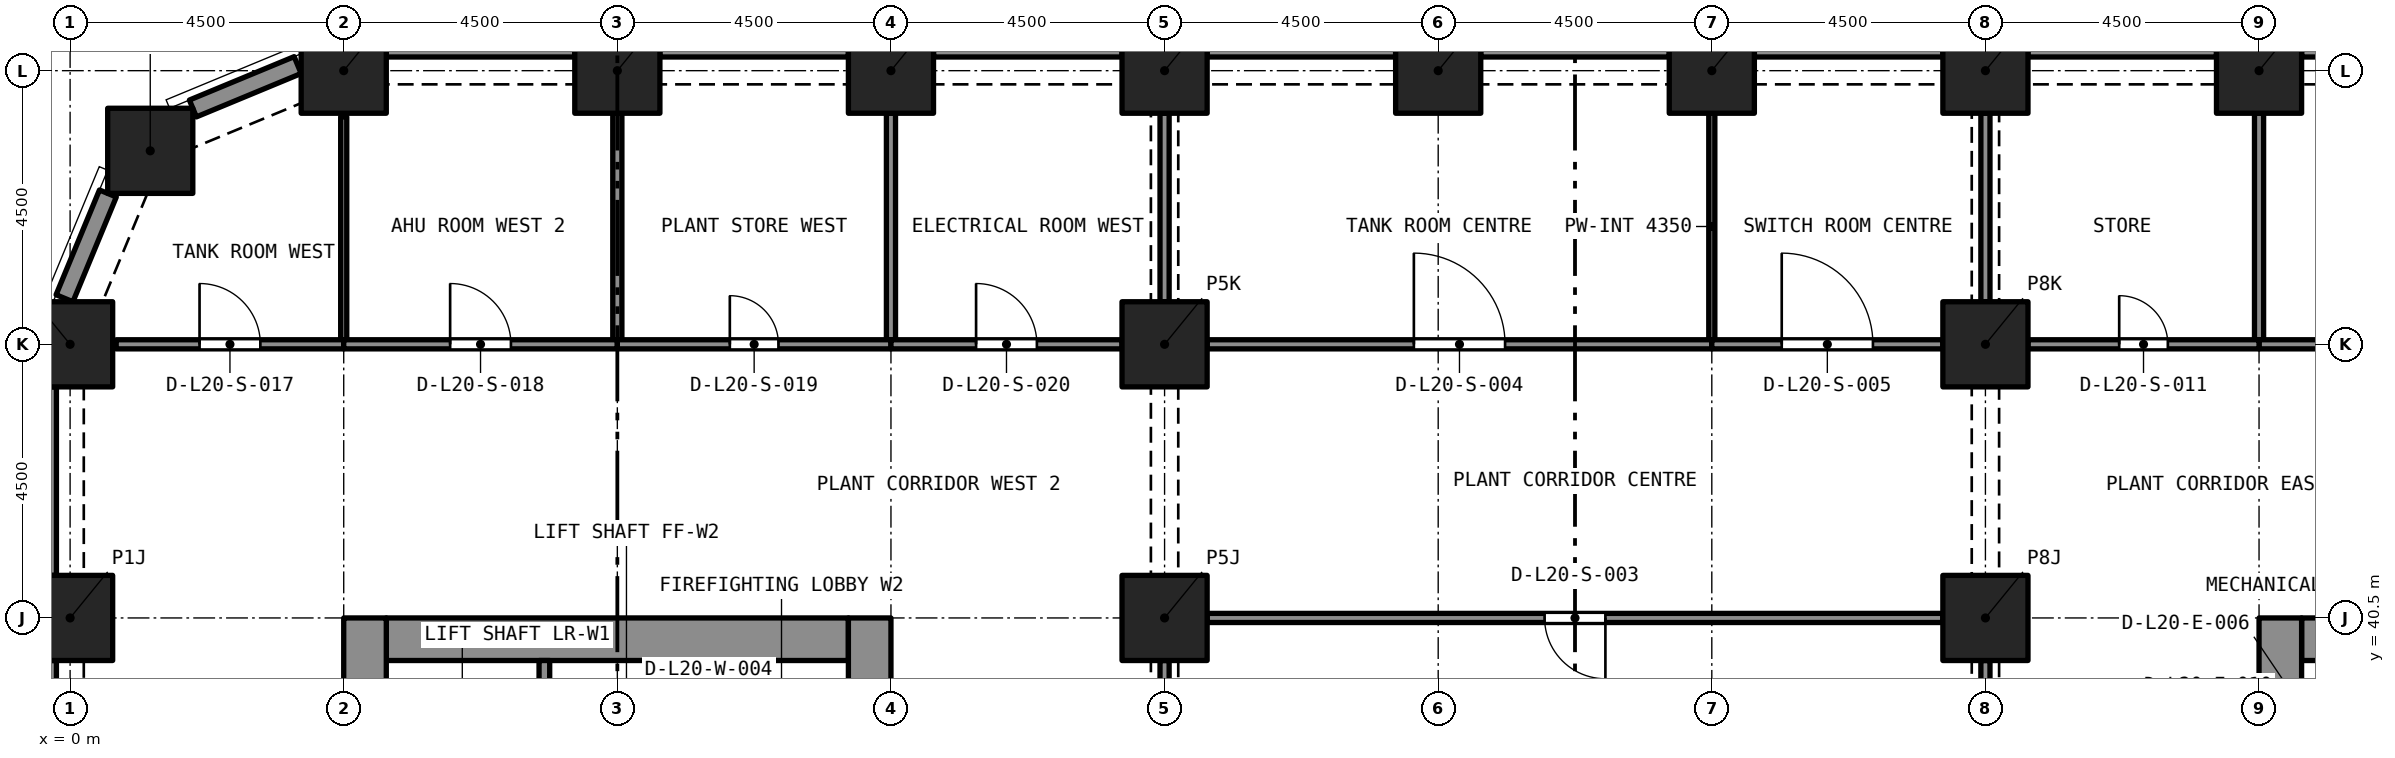
"""IFC4 building model, lengths in metres.
Left out: names, types, materials, properties, quantities, classifications, styles, units other than length and angle.
Written with IfcOpenShell. Run it as: python <this file> out.ifc"""

import sys

from ifc_helpers import new_model, si_unit, direction, frame, frame_2d, origin, origin_2d, place, context, subcontext, project, spatial, rectangle, extrude, element, fill, save


model = new_model("IFC4")
c1 = context("Model", 3, precision=1e-05, world=origin(), true_north=direction((0.0, 1.0)))
c2 = subcontext(c1, "Body", "Model", "MODEL_VIEW")
j1 = project(units=[si_unit("LENGTHUNIT", "METRE"), si_unit("PLANEANGLEUNIT", "RADIAN")], contexts=[c1])
p1 = place(None, origin())
s1 = spatial("IfcSite", under=j1, at=p1, CompositionType="ELEMENT")
p2 = place(p1, origin())
s2 = spatial("IfcBuilding", under=s1, at=p2, CompositionType="ELEMENT")
p3 = place(p2, frame((0.0, 0.0, 75.2)))
s3 = spatial("IfcBuildingStorey", under=s2, at=p3, CompositionType="ELEMENT", Elevation=75.2)
for number, where, z_axis, x_axis in (
    (1, (0.0, 40.5, 0.0), (0.0, 0.0, 1.0), (1.0, 0.0, 0.0)),
    (2, (18.0, 40.5, 0.0), (0.0, 0.0, 1.0), (1.0, 0.0, 0.0)),
    (3, (31.5, 40.5, 0.0), (0.0, 0.0, 1.0), (1.0, 0.0, 0.0)),
    (4, (0.0, 45.0, 0.0), (0.0, 0.0, 1.0), (1.0, 0.0, 0.0)),
    (5, (18.0, 45.0, 0.0), (0.0, 0.0, 1.0), (1.0, 0.0, 0.0)),
    (6, (31.5, 45.0, 0.0), (0.0, 0.0, 1.0), (1.0, 0.0, 0.0)),
    (7, (1.318, 48.182, 0.0), (0.0, 0.0, 1.0), (1.0, 0.0, 0.0)),
    (8, (4.5, 49.5, 0.0), (0.0, 0.0, 1.0), (1.0, 0.0, 0.0)),
    (9, (9.0, 49.5, 0.0), (0.0, 0.0, 1.0), (1.0, 0.0, 0.0)),
    (10, (13.5, 49.5, 0.0), (0.0, 0.0, 1.0), (1.0, 0.0, 0.0)),
    (11, (18.0, 49.5, 0.0), (0.0, 0.0, 1.0), (1.0, 0.0, 0.0)),
    (12, (22.5, 49.5, 0.0), (0.0, 0.0, 1.0), (1.0, 0.0, 0.0)),
    (13, (27.0, 49.5, 0.0), (0.0, 0.0, 1.0), (1.0, 0.0, 0.0)),
    (14, (31.5, 49.5, 0.0), (0.0, 0.0, 1.0), (1.0, 0.0, 0.0)),
    (15, (36.0, 49.5, 0.0), (0.0, 0.0, 1.0), (1.0, 0.0, 0.0)),
):
    element("IfcColumn", number, at=place(p3, frame(where, z_axis=z_axis, x_axis=x_axis)), inside=s3, PredefinedType="COLUMN", context=c2, shape_type="SweptSolid", body=[
        extrude(rectangle(XDim=1.4, YDim=1.4, at=origin_2d()), origin(), (0.0, 0.0, 1.0), 4.8),
    ])
p4 = place(p3, frame((5.2, 40.15, 0.0), z_axis=(0.0, 0.0, 1.0), x_axis=(1.0, 0.0, 0.0)))
e16 = element("IfcWall", 16, at=p4, inside=s3, PredefinedType="SOLIDWALL", context=c2, shape_type="SweptSolid", body=[
    extrude(rectangle(XDim=7.6, YDim=0.7, at=frame_2d((3.8, 0.0))), origin(), (0.0, 0.0, 1.0), 4.8),
])
p5 = place(p3, frame((4.85, 27.0, 0.0), z_axis=(0.0, 0.0, 1.0), x_axis=(0.0, 1.0, 0.0)))
e17 = element("IfcWall", 17, at=p5, inside=s3, PredefinedType="SOLIDWALL", context=c2, shape_type="SweptSolid", body=[
    extrude(rectangle(XDim=13.5, YDim=0.7, at=frame_2d((6.75, 0.0))), origin(), (0.0, 0.0, 1.0), 4.8),
])
p6 = place(p5, frame((8.95, 0.0, 0.0)))
e18 = element("IfcOpeningElement", 18, at=p6, cuts=e17, PredefinedType="OPENING", context=c2, shape_type="SweptSolid", body=[
    extrude(rectangle(XDim=1.2, YDim=2.1, at=frame_2d((0.6, 1.05))), frame((0.0, 0.36, 0.0), z_axis=(0.0, -1.0, 0.0), x_axis=(1.0, 0.0, 0.0)), (0.0, 0.0, 1.0), 0.72),
])
p7 = place(p3, frame((13.15, 27.0, 0.0), z_axis=(0.0, 0.0, 1.0), x_axis=(0.0, 1.0, 0.0)))
e19 = element("IfcWall", 19, at=p7, inside=s3, PredefinedType="SOLIDWALL", context=c2, shape_type="SweptSolid", body=[
    extrude(rectangle(XDim=13.5, YDim=0.7, at=frame_2d((6.75, 0.0))), origin(), (0.0, 0.0, 1.0), 4.8),
])
p8 = place(p7, frame((11.1, 0.0, 0.0)))
e20 = element("IfcOpeningElement", 20, at=p8, cuts=e19, PredefinedType="OPENING", context=c2, shape_type="SweptSolid", body=[
    extrude(rectangle(XDim=1.1, YDim=2.1, at=frame_2d((0.55, 1.05))), frame((0.0, 0.36, 0.0), z_axis=(0.0, -1.0, 0.0), x_axis=(1.0, 0.0, 0.0)), (0.0, 0.0, 1.0), 0.72),
])
p9 = place(p7, frame((8.95, 0.0, 0.0)))
e21 = element("IfcOpeningElement", 21, at=p9, cuts=e19, PredefinedType="OPENING", context=c2, shape_type="SweptSolid", body=[
    extrude(rectangle(XDim=1.2, YDim=2.1, at=frame_2d((0.6, 1.05))), frame((0.0, 0.36, 0.0), z_axis=(0.0, -1.0, 0.0), x_axis=(1.0, 0.0, 0.0)), (0.0, 0.0, 1.0), 0.72),
])
p10 = place(p3, frame((36.7, 40.15, 0.0), z_axis=(0.0, 0.0, 1.0), x_axis=(1.0, 0.0, 0.0)))
e22 = element("IfcWall", 22, at=p10, inside=s3, PredefinedType="SOLIDWALL", context=c2, shape_type="SweptSolid", body=[
    extrude(rectangle(XDim=7.6, YDim=0.7, at=frame_2d((3.8, 0.0))), origin(), (0.0, 0.0, 1.0), 4.8),
])
p11 = place(p3, frame((36.35, 27.0, 0.0), z_axis=(0.0, 0.0, 1.0), x_axis=(0.0, 1.0, 0.0)))
e23 = element("IfcWall", 23, at=p11, inside=s3, PredefinedType="SOLIDWALL", context=c2, shape_type="SweptSolid", body=[
    extrude(rectangle(XDim=13.5, YDim=0.7, at=frame_2d((6.75, 0.0))), origin(), (0.0, 0.0, 1.0), 4.8),
])
p12 = place(p11, frame((8.95, 0.0, 0.0)))
e24 = element("IfcOpeningElement", 24, at=p12, cuts=e23, PredefinedType="OPENING", context=c2, shape_type="SweptSolid", body=[
    extrude(rectangle(XDim=1.2, YDim=2.1, at=frame_2d((0.6, 1.05))), frame((0.0, 0.36, 0.0), z_axis=(0.0, -1.0, 0.0), x_axis=(1.0, 0.0, 0.0)), (0.0, 0.0, 1.0), 0.72),
])
for number, where, z_axis, x_axis in (
    (25, (36.7, 49.875, 0.0), (0.0, 0.0, 1.0), (1.0, 0.0, 0.0)),
    (26, (32.2, 49.875, 0.0), (0.0, 0.0, 1.0), (1.0, 0.0, 0.0)),
    (27, (27.7, 49.875, 0.0), (0.0, 0.0, 1.0), (1.0, 0.0, 0.0)),
    (28, (23.2, 49.875, 0.0), (0.0, 0.0, 1.0), (1.0, 0.0, 0.0)),
    (29, (18.7, 49.875, 0.0), (0.0, 0.0, 1.0), (1.0, 0.0, 0.0)),
    (30, (14.2, 49.875, 0.0), (0.0, 0.0, 1.0), (1.0, 0.0, 0.0)),
    (31, (9.7, 49.875, 0.0), (0.0, 0.0, 1.0), (1.0, 0.0, 0.0)),
    (32, (5.2, 49.875, 0.0), (0.0, 0.0, 1.0), (1.0, 0.0, 0.0)),
):
    element("IfcWall", number, at=place(p3, frame(where, z_axis=z_axis, x_axis=x_axis)), inside=s3, PredefinedType="SOLIDWALL", context=c2, shape_type="SweptSolid", body=[
        extrude(rectangle(XDim=3.1, YDim=0.3, at=frame_2d((1.55, 0.0))), origin(), (0.0, 0.0, 1.0), 4.8),
    ])
p13 = place(p3, frame((2.02, 48.878, 0.0), z_axis=(0.0, 0.0, 1.0), x_axis=(0.923903565336, 0.38262540684, 0.0)))
e33 = element("IfcWall", 33, at=p13, inside=s3, PredefinedType="SOLIDWALL", context=c2, shape_type="SweptSolid", body=[
    extrude(rectangle(XDim=1.865, YDim=0.3, at=frame_2d((0.933, 0.0))), origin(), (0.0, 0.0, 1.0), 4.8),
])
p14 = place(p3, frame((-0.092, 45.757, 0.0), z_axis=(0.0, 0.0, 1.0), x_axis=(0.382737135771, 0.923857286003, 0.0)))
e34 = element("IfcWall", 34, at=p14, inside=s3, PredefinedType="SOLIDWALL", context=c2, shape_type="SweptSolid", body=[
    extrude(rectangle(XDim=1.865, YDim=0.3, at=frame_2d((0.933, 0.0))), origin(), (0.0, 0.0, 1.0), 4.8),
])
for number, where, z_axis, x_axis in (
    (35, (-0.375, 41.2, 0.0), (0.0, 0.0, 1.0), (0.0, 1.0, 0.0)),
    (36, (-0.375, 36.7, 0.0), (0.0, 0.0, 1.0), (0.0, 1.0, 0.0)),
):
    element("IfcWall", number, at=place(p3, frame(where, z_axis=z_axis, x_axis=x_axis)), inside=s3, PredefinedType="SOLIDWALL", context=c2, shape_type="SweptSolid", body=[
        extrude(rectangle(XDim=3.1, YDim=0.3, at=frame_2d((1.55, 0.0))), origin(), (0.0, 0.0, 1.0), 4.8),
    ])
p15 = place(p3, frame((7.8, 37.5, 0.0), z_axis=(0.0, 0.0, 1.0), x_axis=(0.0, 1.0, 0.0)))
e37 = element("IfcWall", 37, at=p15, inside=s3, PredefinedType="SOLIDWALL", context=c2, shape_type="SweptSolid", body=[
    extrude(rectangle(XDim=2.3, YDim=0.175, at=frame_2d((1.15, 0.0))), origin(), (0.0, 0.0, 1.0), 4.5),
])
p16 = place(p3, frame((10.5, 37.5, 0.0), z_axis=(0.0, 0.0, 1.0), x_axis=(0.0, 1.0, 0.0)))
e38 = element("IfcWall", 38, at=p16, inside=s3, PredefinedType="SOLIDWALL", context=c2, shape_type="SweptSolid", body=[
    extrude(rectangle(XDim=2.3, YDim=0.175, at=frame_2d((1.15, 0.0))), origin(), (0.0, 0.0, 1.0), 4.5),
])
p17 = place(p16, frame((0.65, 0.0, 0.0)))
e39 = element("IfcOpeningElement", 39, at=p17, cuts=e38, PredefinedType="OPENING", context=c2, shape_type="SweptSolid", body=[
    extrude(rectangle(XDim=1.0, YDim=2.1, at=frame_2d((0.5, 1.05))), frame((0.0, 0.097, 0.0), z_axis=(0.0, -1.0, 0.0), x_axis=(1.0, 0.0, 0.0)), (0.0, 0.0, 1.0), 0.195),
])
p18 = place(p3, frame((30.8, 40.5, 0.0), z_axis=(0.0, 0.0, 1.0), x_axis=(-1.0, 0.0, 0.0)))
e40 = element("IfcWall", 40, at=p18, inside=s3, PredefinedType="PARTITIONING", context=c2, shape_type="SweptSolid", body=[
    extrude(rectangle(XDim=12.1, YDim=0.15, at=frame_2d((6.05, 0.0))), origin(), (0.0, 0.0, 1.0), 4.35),
])
p19 = place(p18, frame((5.55, 0.0, 0.0)))
e41 = element("IfcOpeningElement", 41, at=p19, cuts=e40, PredefinedType="OPENING", context=c2, shape_type="SweptSolid", body=[
    extrude(rectangle(XDim=1.0, YDim=2.1, at=frame_2d((0.5, 1.05))), frame((0.0, 0.085, 0.0), z_axis=(0.0, -1.0, 0.0), x_axis=(1.0, 0.0, 0.0)), (0.0, 0.0, 1.0), 0.17),
])
for number, where, z_axis, x_axis in (
    (42, (31.5, 36.7, 0.0), (0.0, 0.0, 1.0), (0.0, 1.0, 0.0)),
    (43, (18.0, 36.7, 0.0), (0.0, 0.0, 1.0), (0.0, 1.0, 0.0)),
):
    element("IfcWall", number, at=place(p3, frame(where, z_axis=z_axis, x_axis=x_axis)), inside=s3, PredefinedType="PARTITIONING", context=c2, shape_type="SweptSolid", body=[
        extrude(rectangle(XDim=3.1, YDim=0.15, at=frame_2d((1.55, 0.0))), origin(), (0.0, 0.0, 1.0), 3.98),
    ])
p20 = place(p3, frame((27.0, 45.075, 0.0), z_axis=(0.0, 0.0, 1.0), x_axis=(0.0, 1.0, 0.0)))
e44 = element("IfcWall", 44, at=p20, inside=s3, PredefinedType="PARTITIONING", context=c2, shape_type="SweptSolid", body=[
    extrude(rectangle(XDim=3.725, YDim=0.1, at=frame_2d((1.863, 0.0))), origin(), (0.0, 0.0, 1.0), 4.35),
])
p21 = place(p3, frame((18.7, 45.0, 0.0), z_axis=(0.0, 0.0, 1.0), x_axis=(1.0, 0.0, 0.0)))
e45 = element("IfcWall", 45, at=p21, inside=s3, PredefinedType="PARTITIONING", context=c2, shape_type="SweptSolid", body=[
    extrude(rectangle(XDim=8.3, YDim=0.15, at=frame_2d((4.15, 0.0))), origin(), (0.0, 0.0, 1.0), 4.35),
])
p22 = place(p21, frame((3.4, 0.0, 0.0)))
e46 = element("IfcOpeningElement", 46, at=p22, cuts=e45, PredefinedType="OPENING", context=c2, shape_type="SweptSolid", body=[
    extrude(rectangle(XDim=1.5, YDim=2.4, at=frame_2d((0.75, 1.2))), frame((0.0, 0.085, 0.0), z_axis=(0.0, -1.0, 0.0), x_axis=(1.0, 0.0, 0.0)), (0.0, 0.0, 1.0), 0.17),
])
p23 = place(p3, frame((18.0, 45.7, 0.0), z_axis=(0.0, 0.0, 1.0), x_axis=(0.0, 1.0, 0.0)))
e47 = element("IfcWall", 47, at=p23, inside=s3, PredefinedType="PARTITIONING", context=c2, shape_type="SweptSolid", body=[
    extrude(rectangle(XDim=3.1, YDim=0.15, at=frame_2d((1.55, 0.0))), origin(), (0.0, 0.0, 1.0), 3.98),
])
p24 = place(p3, frame((27.0, 45.0, 0.0), z_axis=(0.0, 0.0, 1.0), x_axis=(1.0, 0.0, 0.0)))
e48 = element("IfcWall", 48, at=p24, inside=s3, PredefinedType="PARTITIONING", context=c2, shape_type="SweptSolid", body=[
    extrude(rectangle(XDim=3.8, YDim=0.15, at=frame_2d((1.9, 0.0))), origin(), (0.0, 0.0, 1.0), 4.35),
])
p25 = place(p24, frame((1.15, 0.0, 0.0)))
e49 = element("IfcOpeningElement", 49, at=p25, cuts=e48, PredefinedType="OPENING", context=c2, shape_type="SweptSolid", body=[
    extrude(rectangle(XDim=1.5, YDim=2.4, at=frame_2d((0.75, 1.2))), frame((0.0, 0.085, 0.0), z_axis=(0.0, -1.0, 0.0), x_axis=(1.0, 0.0, 0.0)), (0.0, 0.0, 1.0), 0.17),
])
p26 = place(p3, frame((31.5, 45.7, 0.0), z_axis=(0.0, 0.0, 1.0), x_axis=(0.0, 1.0, 0.0)))
e50 = element("IfcWall", 50, at=p26, inside=s3, PredefinedType="PARTITIONING", context=c2, shape_type="SweptSolid", body=[
    extrude(rectangle(XDim=3.1, YDim=0.15, at=frame_2d((1.55, 0.0))), origin(), (0.0, 0.0, 1.0), 3.98),
])
p27 = place(p3, frame((36.0, 45.075, 0.0), z_axis=(0.0, 0.0, 1.0), x_axis=(0.0, 1.0, 0.0)))
e51 = element("IfcWall", 51, at=p27, inside=s3, PredefinedType="PARTITIONING", context=c2, shape_type="SweptSolid", body=[
    extrude(rectangle(XDim=3.725, YDim=0.15, at=frame_2d((1.863, 0.0))), origin(), (0.0, 0.0, 1.0), 4.5),
])
p28 = place(p3, frame((36.0, 45.0, 0.0), z_axis=(0.0, 0.0, 1.0), x_axis=(1.0, 0.0, 0.0)))
e52 = element("IfcWall", 52, at=p28, inside=s3, PredefinedType="PARTITIONING", context=c2, shape_type="SweptSolid", body=[
    extrude(rectangle(XDim=4.5, YDim=0.15, at=frame_2d((2.25, 0.0))), origin(), (0.0, 0.0, 1.0), 4.5),
])
p29 = place(p28, frame((1.75, 0.0, 0.0)))
e53 = element("IfcOpeningElement", 53, at=p29, cuts=e52, PredefinedType="OPENING", context=c2, shape_type="SweptSolid", body=[
    extrude(rectangle(XDim=1.0, YDim=2.1, at=frame_2d((0.5, 1.05))), frame((0.0, 0.085, 0.0), z_axis=(0.0, -1.0, 0.0), x_axis=(1.0, 0.0, 0.0)), (0.0, 0.0, 1.0), 0.17),
])
p30 = place(p3, frame((32.2, 45.0, 0.0), z_axis=(0.0, 0.0, 1.0), x_axis=(1.0, 0.0, 0.0)))
e54 = element("IfcWall", 54, at=p30, inside=s3, PredefinedType="PARTITIONING", context=c2, shape_type="SweptSolid", body=[
    extrude(rectangle(XDim=3.8, YDim=0.15, at=frame_2d((1.9, 0.0))), origin(), (0.0, 0.0, 1.0), 4.5),
])
p31 = place(p30, frame((1.5, 0.0, 0.0)))
e55 = element("IfcOpeningElement", 55, at=p31, cuts=e54, PredefinedType="OPENING", context=c2, shape_type="SweptSolid", body=[
    extrude(rectangle(XDim=0.8, YDim=2.1, at=frame_2d((0.4, 1.05))), frame((0.0, 0.085, 0.0), z_axis=(0.0, -1.0, 0.0), x_axis=(1.0, 0.0, 0.0)), (0.0, 0.0, 1.0), 0.17),
])
p32 = place(p3, frame((4.5, 45.075, 0.0), z_axis=(0.0, 0.0, 1.0), x_axis=(0.0, 1.0, 0.0)))
e56 = element("IfcWall", 56, at=p32, inside=s3, PredefinedType="PARTITIONING", context=c2, shape_type="SweptSolid", body=[
    extrude(rectangle(XDim=3.667, YDim=0.1, at=frame_2d((1.834, 0.0))), origin(), (0.0, 0.0, 1.0), 4.5),
])
p33 = place(p3, frame((0.758, 45.0, 0.0), z_axis=(0.0, 0.0, 1.0), x_axis=(1.0, 0.0, 0.0)))
e57 = element("IfcWall", 57, at=p33, inside=s3, PredefinedType="PARTITIONING", context=c2, shape_type="SweptSolid", body=[
    extrude(rectangle(XDim=3.742, YDim=0.15, at=frame_2d((1.871, 0.0))), origin(), (0.0, 0.0, 1.0), 4.5),
])
p34 = place(p33, frame((1.371, 0.0, 0.0)))
e58 = element("IfcOpeningElement", 58, at=p34, cuts=e57, PredefinedType="OPENING", context=c2, shape_type="SweptSolid", body=[
    extrude(rectangle(XDim=1.0, YDim=2.1, at=frame_2d((0.5, 1.05))), frame((0.0, 0.085, 0.0), z_axis=(0.0, -1.0, 0.0), x_axis=(1.0, 0.0, 0.0)), (0.0, 0.0, 1.0), 0.17),
])
p35 = place(p3, frame((9.0, 45.075, 0.0), z_axis=(0.0, 0.0, 1.0), x_axis=(0.0, 1.0, 0.0)))
e59 = element("IfcWall", 59, at=p35, inside=s3, PredefinedType="PARTITIONING", context=c2, shape_type="SweptSolid", body=[
    extrude(rectangle(XDim=3.725, YDim=0.15, at=frame_2d((1.863, 0.0))), origin(), (0.0, 0.0, 1.0), 4.5),
])
p36 = place(p3, frame((4.5, 45.0, 0.0), z_axis=(0.0, 0.0, 1.0), x_axis=(1.0, 0.0, 0.0)))
e60 = element("IfcWall", 60, at=p36, inside=s3, PredefinedType="PARTITIONING", context=c2, shape_type="SweptSolid", body=[
    extrude(rectangle(XDim=4.5, YDim=0.15, at=frame_2d((2.25, 0.0))), origin(), (0.0, 0.0, 1.0), 4.5),
])
p37 = place(p36, frame((1.75, 0.0, 0.0)))
e61 = element("IfcOpeningElement", 61, at=p37, cuts=e60, PredefinedType="OPENING", context=c2, shape_type="SweptSolid", body=[
    extrude(rectangle(XDim=1.0, YDim=2.1, at=frame_2d((0.5, 1.05))), frame((0.0, 0.085, 0.0), z_axis=(0.0, -1.0, 0.0), x_axis=(1.0, 0.0, 0.0)), (0.0, 0.0, 1.0), 0.17),
])
p38 = place(p3, frame((13.5, 45.075, 0.0), z_axis=(0.0, 0.0, 1.0), x_axis=(0.0, 1.0, 0.0)))
e62 = element("IfcWall", 62, at=p38, inside=s3, PredefinedType="PARTITIONING", context=c2, shape_type="SweptSolid", body=[
    extrude(rectangle(XDim=3.725, YDim=0.15, at=frame_2d((1.863, 0.0))), origin(), (0.0, 0.0, 1.0), 4.5),
])
p39 = place(p3, frame((9.0, 45.0, 0.0), z_axis=(0.0, 0.0, 1.0), x_axis=(1.0, 0.0, 0.0)))
e63 = element("IfcWall", 63, at=p39, inside=s3, PredefinedType="PARTITIONING", context=c2, shape_type="SweptSolid", body=[
    extrude(rectangle(XDim=4.5, YDim=0.15, at=frame_2d((2.25, 0.0))), origin(), (0.0, 0.0, 1.0), 4.5),
])
p40 = place(p39, frame((1.85, 0.0, 0.0)))
e64 = element("IfcOpeningElement", 64, at=p40, cuts=e63, PredefinedType="OPENING", context=c2, shape_type="SweptSolid", body=[
    extrude(rectangle(XDim=0.8, YDim=2.1, at=frame_2d((0.4, 1.05))), frame((0.0, 0.085, 0.0), z_axis=(0.0, -1.0, 0.0), x_axis=(1.0, 0.0, 0.0)), (0.0, 0.0, 1.0), 0.17),
])
p41 = place(p3, frame((13.5, 45.0, 0.0), z_axis=(0.0, 0.0, 1.0), x_axis=(1.0, 0.0, 0.0)))
e65 = element("IfcWall", 65, at=p41, inside=s3, PredefinedType="PARTITIONING", context=c2, shape_type="SweptSolid", body=[
    extrude(rectangle(XDim=3.8, YDim=0.15, at=frame_2d((1.9, 0.0))), origin(), (0.0, 0.0, 1.0), 4.5),
])
p42 = place(p41, frame((1.4, 0.0, 0.0)))
e66 = element("IfcOpeningElement", 66, at=p42, cuts=e65, PredefinedType="OPENING", context=c2, shape_type="SweptSolid", body=[
    extrude(rectangle(XDim=1.0, YDim=2.1, at=frame_2d((0.5, 1.05))), frame((0.0, 0.085, 0.0), z_axis=(0.0, -1.0, 0.0), x_axis=(1.0, 0.0, 0.0)), (0.0, 0.0, 1.0), 0.17),
])
p43 = place(p19, origin())
e67 = element("IfcDoor", 67, at=p43, inside=s3, OperationType="SINGLE_SWING_RIGHT", PredefinedType="DOOR", context=c2, shape_type="SweptSolid", body=[
    extrude(rectangle(XDim=1.0, YDim=2.1, at=frame_2d((0.5, 1.05))), frame((0.0, 0.025, 0.0), z_axis=(0.0, -1.0, 0.0), x_axis=(1.0, 0.0, 0.0)), (0.0, 0.0, 1.0), 0.05),
])
fill(e41, e67)
p44 = place(p22, origin())
e68 = element("IfcDoor", 68, at=p44, inside=s3, OperationType="DOUBLE_DOOR_SINGLE_SWING", PredefinedType="DOOR", context=c2, shape_type="SweptSolid", body=[
    extrude(rectangle(XDim=1.5, YDim=2.4, at=frame_2d((0.75, 1.2))), frame((0.0, 0.025, 0.0), z_axis=(0.0, -1.0, 0.0), x_axis=(1.0, 0.0, 0.0)), (0.0, 0.0, 1.0), 0.05),
])
fill(e46, e68)
p45 = place(p25, origin())
e69 = element("IfcDoor", 69, at=p45, inside=s3, OperationType="DOUBLE_DOOR_SINGLE_SWING", PredefinedType="DOOR", context=c2, shape_type="SweptSolid", body=[
    extrude(rectangle(XDim=1.5, YDim=2.4, at=frame_2d((0.75, 1.2))), frame((0.0, 0.025, 0.0), z_axis=(0.0, -1.0, 0.0), x_axis=(1.0, 0.0, 0.0)), (0.0, 0.0, 1.0), 0.05),
])
fill(e49, e69)
p46 = place(p31, origin())
e70 = element("IfcDoor", 70, at=p46, inside=s3, OperationType="SINGLE_SWING_RIGHT", PredefinedType="DOOR", context=c2, shape_type="SweptSolid", body=[
    extrude(rectangle(XDim=0.8, YDim=2.1, at=frame_2d((0.4, 1.05))), frame((0.0, 0.025, 0.0), z_axis=(0.0, -1.0, 0.0), x_axis=(1.0, 0.0, 0.0)), (0.0, 0.0, 1.0), 0.05),
])
fill(e55, e70)
p47 = place(p34, origin())
e71 = element("IfcDoor", 71, at=p47, inside=s3, OperationType="SINGLE_SWING_RIGHT", PredefinedType="DOOR", context=c2, shape_type="SweptSolid", body=[
    extrude(rectangle(XDim=1.0, YDim=2.1, at=frame_2d((0.5, 1.05))), frame((0.0, 0.025, 0.0), z_axis=(0.0, -1.0, 0.0), x_axis=(1.0, 0.0, 0.0)), (0.0, 0.0, 1.0), 0.05),
])
fill(e58, e71)
p48 = place(p37, origin())
e72 = element("IfcDoor", 72, at=p48, inside=s3, OperationType="SINGLE_SWING_RIGHT", PredefinedType="DOOR", context=c2, shape_type="SweptSolid", body=[
    extrude(rectangle(XDim=1.0, YDim=2.1, at=frame_2d((0.5, 1.05))), frame((0.0, 0.025, 0.0), z_axis=(0.0, -1.0, 0.0), x_axis=(1.0, 0.0, 0.0)), (0.0, 0.0, 1.0), 0.05),
])
fill(e61, e72)
p49 = place(p40, origin())
e73 = element("IfcDoor", 73, at=p49, inside=s3, OperationType="SINGLE_SWING_RIGHT", PredefinedType="DOOR", context=c2, shape_type="SweptSolid", body=[
    extrude(rectangle(XDim=0.8, YDim=2.1, at=frame_2d((0.4, 1.05))), frame((0.0, 0.025, 0.0), z_axis=(0.0, -1.0, 0.0), x_axis=(1.0, 0.0, 0.0)), (0.0, 0.0, 1.0), 0.05),
])
fill(e64, e73)
p50 = place(p42, origin())
e74 = element("IfcDoor", 74, at=p50, inside=s3, OperationType="SINGLE_SWING_RIGHT", PredefinedType="DOOR", context=c2, shape_type="SweptSolid", body=[
    extrude(rectangle(XDim=1.0, YDim=2.1, at=frame_2d((0.5, 1.05))), frame((0.0, 0.025, 0.0), z_axis=(0.0, -1.0, 0.0), x_axis=(1.0, 0.0, 0.0)), (0.0, 0.0, 1.0), 0.05),
])
fill(e66, e74)
save(model, sys.argv[1])
